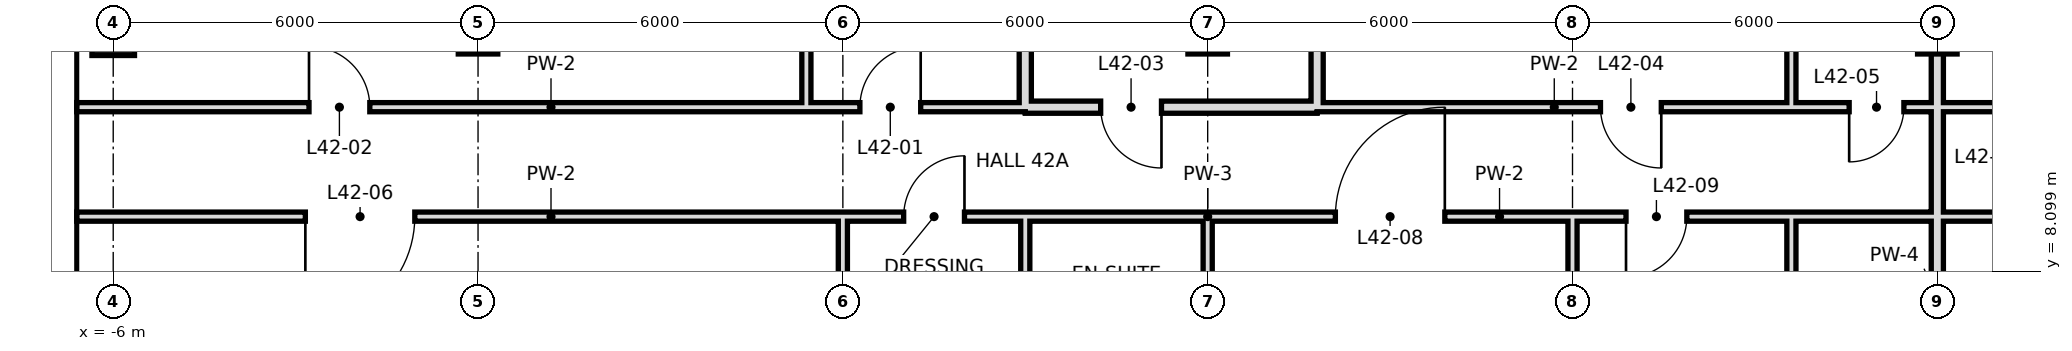
"""IFC4 building model, lengths in metres.
Left out: names, types, materials, properties, quantities, classifications, styles, units other than length and angle.
Written with IfcOpenShell. Run it as: python <this file> out.ifc"""

import sys

from ifc_helpers import new_model, si_unit, direction, frame, frame_2d, origin, origin_2d, place, context, subcontext, project, spatial, rectangle, hollow_rectangle, extrude, element, fill, save


model = new_model("IFC4")
c1 = context("Model", 3, precision=1e-05, world=origin(), true_north=direction((0.0, 1.0)))
c2 = subcontext(c1, "Body", "Model", "MODEL_VIEW")
j1 = project(units=[si_unit("LENGTHUNIT", "METRE"), si_unit("PLANEANGLEUNIT", "RADIAN")], contexts=[c1])
p1 = place(None, origin())
s1 = spatial("IfcSite", under=j1, at=p1, CompositionType="ELEMENT")
p2 = place(p1, origin())
s2 = spatial("IfcBuilding", under=s1, at=p2, CompositionType="ELEMENT")
p3 = place(p2, frame((0.0, 0.0, 181.6)))
s3 = spatial("IfcBuildingStorey", under=s2, at=p3, CompositionType="ELEMENT", Elevation=181.6)
p4 = place(p3, frame((-6.0, 12.0, 0.0), z_axis=(0.0, 0.0, 1.0), x_axis=(1.0, 0.0, 0.0)))
e1 = element("IfcColumn", 1, at=p4, inside=s3, PredefinedType="COLUMN", context=c2, shape_type="SweptSolid", body=[
    extrude(hollow_rectangle(XDim=0.7, YDim=0.7, WallThickness=0.036, at=origin_2d()), origin(), (0.0, 0.0, 1.0), 4.4),
])
for number, where, z_axis, x_axis in (
    (2, (0.0, 12.0, 0.0), (0.0, 0.0, 1.0), (1.0, 0.0, 0.0)),
    (3, (12.0, 12.0, 0.0), (0.0, 0.0, 1.0), (1.0, 0.0, 0.0)),
    (4, (24.0, 12.0, 0.0), (0.0, 0.0, 1.0), (1.0, 0.0, 0.0)),
):
    element("IfcColumn", number, at=place(p3, frame(where, z_axis=z_axis, x_axis=x_axis)), inside=s3, PredefinedType="COLUMN", context=c2, shape_type="SweptSolid", body=[
        extrude(hollow_rectangle(XDim=0.65, YDim=0.65, WallThickness=0.032, at=origin_2d()), origin(), (0.0, 0.0, 1.0), 4.4),
    ])
p5 = place(p3, frame((12.0, 6.0, 0.0), z_axis=(0.0, 0.0, 1.0), x_axis=(0.0, 1.0, 0.0)))
e5 = element("IfcWall", 5, at=p5, inside=s3, PredefinedType="PARTITIONING", context=c2, shape_type="SweptSolid", body=[
    extrude(rectangle(XDim=3.0, YDim=0.15, at=frame_2d((1.5, 0.0))), origin(), (0.0, 0.0, 1.0), 3.4),
])
p6 = place(p3, frame((13.8, 10.8, 0.0), z_axis=(0.0, 0.0, 1.0), x_axis=(0.0, 1.0, 0.0)))
e6 = element("IfcWall", 6, at=p6, inside=s3, PredefinedType="SOLIDWALL", context=c2, shape_type="SweptSolid", body=[
    extrude(rectangle(XDim=4.5, YDim=0.2, at=frame_2d((2.25, 0.0))), origin(), (0.0, 0.0, 1.0), 3.4),
])
p7 = place(p3, frame((18.0, -0.6, 0.0), z_axis=(0.0, 0.0, 1.0), x_axis=(0.0, 1.0, 0.0)))
e7 = element("IfcWall", 7, at=p7, inside=s3, PredefinedType="PARTITIONING", context=c2, shape_type="SweptSolid", body=[
    extrude(rectangle(XDim=9.6, YDim=0.15, at=frame_2d((4.8, 0.0))), origin(), (0.0, 0.0, 1.0), 3.4),
])
p8 = place(p3, frame((21.6, 6.0, 0.0), z_axis=(0.0, 0.0, 1.0), x_axis=(0.0, 1.0, 0.0)))
e8 = element("IfcWall", 8, at=p8, inside=s3, PredefinedType="PARTITIONING", context=c2, shape_type="SweptSolid", body=[
    extrude(rectangle(XDim=3.0, YDim=0.15, at=frame_2d((1.5, 0.0))), origin(), (0.0, 0.0, 1.0), 4.1),
])
p9 = place(p3, frame((21.6, 10.8, 0.0), z_axis=(0.0, 0.0, 1.0), x_axis=(0.0, 1.0, 0.0)))
e9 = element("IfcWall", 9, at=p9, inside=s3, PredefinedType="PARTITIONING", context=c2, shape_type="SweptSolid", body=[
    extrude(rectangle(XDim=4.5, YDim=0.15, at=frame_2d((2.25, 0.0))), origin(), (0.0, 0.0, 1.0), 4.1),
])
p10 = place(p3, frame((24.0, 0.0, 0.0), z_axis=(0.0, 0.0, 1.0), x_axis=(0.0, 1.0, 0.0)))
e10 = element("IfcWall", 10, at=p10, inside=s3, PredefinedType="SOLIDWALL", context=c2, shape_type="SweptSolid", body=[
    extrude(rectangle(XDim=15.3, YDim=0.2, at=frame_2d((7.65, 0.0))), origin(), (0.0, 0.0, 1.0), 3.4),
])
p11 = place(p3, frame((5.4, 10.8, 0.0), z_axis=(0.0, 0.0, 1.0), x_axis=(0.0, 1.0, 0.0)))
e11 = element("IfcWall", 11, at=p11, inside=s3, PredefinedType="PARTITIONING", context=c2, shape_type="SweptSolid", body=[
    extrude(rectangle(XDim=4.5, YDim=0.15, at=frame_2d((2.25, 0.0))), origin(), (0.0, 0.0, 1.0), 4.1),
])
p12 = place(p3, frame((6.0, -0.6, 0.0), z_axis=(0.0, 0.0, 1.0), x_axis=(0.0, 1.0, 0.0)))
e12 = element("IfcWall", 12, at=p12, inside=s3, PredefinedType="PARTITIONING", context=c2, shape_type="SweptSolid", body=[
    extrude(rectangle(XDim=9.6, YDim=0.15, at=frame_2d((4.8, 0.0))), origin(), (0.0, 0.0, 1.0), 3.4),
])
p13 = place(p3, frame((9.0, 10.8, 0.0), z_axis=(0.0, 0.0, 1.0), x_axis=(0.0, 1.0, 0.0)))
e13 = element("IfcWall", 13, at=p13, inside=s3, PredefinedType="SOLIDWALL", context=c2, shape_type="SweptSolid", body=[
    extrude(rectangle(XDim=4.5, YDim=0.2, at=frame_2d((2.25, 0.0))), origin(), (0.0, 0.0, 1.0), 3.4),
])
p14 = place(p3, frame((9.0, 6.0, 0.0), z_axis=(0.0, 0.0, 1.0), x_axis=(0.0, 1.0, 0.0)))
e14 = element("IfcWall", 14, at=p14, inside=s3, PredefinedType="PARTITIONING", context=c2, shape_type="SweptSolid", body=[
    extrude(rectangle(XDim=3.0, YDim=0.15, at=frame_2d((1.5, 0.0))), origin(), (0.0, 0.0, 1.0), 4.1),
])
p15 = place(p3, frame((9.0, 10.8, 0.0), z_axis=(0.0, 0.0, 1.0), x_axis=(1.0, 0.0, 0.0)))
e15 = element("IfcWall", 15, at=p15, inside=s3, PredefinedType="SOLIDWALL", context=c2, shape_type="SweptSolid", body=[
    extrude(rectangle(XDim=4.8, YDim=0.2, at=frame_2d((2.4, 0.0))), origin(), (0.0, 0.0, 1.0), 3.4),
])
p16 = place(p15, frame((1.24, 0.0, 0.0)))
e16 = element("IfcOpeningElement", 16, at=p16, cuts=e15, PredefinedType="OPENING", context=c2, shape_type="SweptSolid", body=[
    extrude(rectangle(XDim=1.0, YDim=2.4, at=frame_2d((0.5, 1.2))), frame((0.0, 0.11, 0.0), z_axis=(0.0, -1.0, 0.0), x_axis=(1.0, 0.0, 0.0)), (0.0, 0.0, 1.0), 0.22),
])
p17 = place(p3, frame((-6.6, 10.8, 0.0), z_axis=(0.0, 0.0, 1.0), x_axis=(1.0, 0.0, 0.0)))
e17 = element("IfcWall", 17, at=p17, inside=s3, PredefinedType="PARTITIONING", context=c2, shape_type="SweptSolid", body=[
    extrude(rectangle(XDim=15.6, YDim=0.15, at=frame_2d((7.8, 0.0))), origin(), (0.0, 0.0, 1.0), 4.1),
])
p18 = place(p17, frame((12.88, 0.0, 0.0)))
e18 = element("IfcOpeningElement", 18, at=p18, cuts=e17, PredefinedType="OPENING", context=c2, shape_type="SweptSolid", body=[
    extrude(rectangle(XDim=1.0, YDim=2.4, at=frame_2d((0.5, 1.2))), frame((0.0, 0.085, 0.0), z_axis=(0.0, -1.0, 0.0), x_axis=(1.0, 0.0, 0.0)), (0.0, 0.0, 1.0), 0.17),
])
p19 = place(p17, frame((3.82, 0.0, 0.0)))
e19 = element("IfcOpeningElement", 19, at=p19, cuts=e17, PredefinedType="OPENING", context=c2, shape_type="SweptSolid", body=[
    extrude(rectangle(XDim=1.0, YDim=2.4, at=frame_2d((0.5, 1.2))), frame((0.0, 0.085, 0.0), z_axis=(0.0, -1.0, 0.0), x_axis=(1.0, 0.0, 0.0)), (0.0, 0.0, 1.0), 0.17),
])
p20 = place(p3, frame((13.8, 10.8, 0.0), z_axis=(0.0, 0.0, 1.0), x_axis=(1.0, 0.0, 0.0)))
e20 = element("IfcWall", 20, at=p20, inside=s3, PredefinedType="PARTITIONING", context=c2, shape_type="SweptSolid", body=[
    extrude(rectangle(XDim=7.8, YDim=0.15, at=frame_2d((3.9, 0.0))), origin(), (0.0, 0.0, 1.0), 4.1),
])
p21 = place(p20, frame((4.66, 0.0, 0.0)))
e21 = element("IfcOpeningElement", 21, at=p21, cuts=e20, PredefinedType="OPENING", context=c2, shape_type="SweptSolid", body=[
    extrude(rectangle(XDim=1.0, YDim=2.4, at=frame_2d((0.5, 1.2))), frame((0.0, 0.085, 0.0), z_axis=(0.0, -1.0, 0.0), x_axis=(1.0, 0.0, 0.0)), (0.0, 0.0, 1.0), 0.17),
])
p22 = place(p3, frame((24.0, 10.8, 0.0), z_axis=(0.0, 0.0, 1.0), x_axis=(1.0, 0.0, 0.0)))
e22 = element("IfcWall", 22, at=p22, inside=s3, PredefinedType="PARTITIONING", context=c2, shape_type="SweptSolid", body=[
    extrude(rectangle(XDim=3.6, YDim=0.15, at=frame_2d((1.8, 0.0))), origin(), (0.0, 0.0, 1.0), 4.1),
])
p23 = place(p22, frame((1.72, 0.0, 0.0)))
e23 = element("IfcOpeningElement", 23, at=p23, cuts=e22, PredefinedType="OPENING", context=c2, shape_type="SweptSolid", body=[
    extrude(rectangle(XDim=1.0, YDim=2.4, at=frame_2d((0.5, 1.2))), frame((0.0, 0.085, 0.0), z_axis=(0.0, -1.0, 0.0), x_axis=(1.0, 0.0, 0.0)), (0.0, 0.0, 1.0), 0.17),
])
p24 = place(p3, frame((21.6, 10.8, 0.0), z_axis=(0.0, 0.0, 1.0), x_axis=(1.0, 0.0, 0.0)))
e24 = element("IfcWall", 24, at=p24, inside=s3, PredefinedType="PARTITIONING", context=c2, shape_type="SweptSolid", body=[
    extrude(rectangle(XDim=2.4, YDim=0.15, at=frame_2d((1.2, 0.0))), origin(), (0.0, 0.0, 1.0), 4.1),
])
p25 = place(p24, frame((0.95, 0.0, 0.0)))
e25 = element("IfcOpeningElement", 25, at=p25, cuts=e24, PredefinedType="OPENING", context=c2, shape_type="SweptSolid", body=[
    extrude(rectangle(XDim=0.9, YDim=2.4, at=frame_2d((0.45, 1.2))), frame((0.0, 0.085, 0.0), z_axis=(0.0, -1.0, 0.0), x_axis=(1.0, 0.0, 0.0)), (0.0, 0.0, 1.0), 0.17),
])
p26 = place(p3, frame((-6.6, 9.0, 0.0), z_axis=(0.0, 0.0, 1.0), x_axis=(1.0, 0.0, 0.0)))
e26 = element("IfcWall", 26, at=p26, inside=s3, PredefinedType="PARTITIONING", context=c2, shape_type="SweptSolid", body=[
    extrude(rectangle(XDim=15.6, YDim=0.15, at=frame_2d((7.8, 0.0))), origin(), (0.0, 0.0, 1.0), 4.1),
])
p27 = place(p26, frame((3.76, 0.0, 0.0)))
e27 = element("IfcOpeningElement", 27, at=p27, cuts=e26, PredefinedType="OPENING", context=c2, shape_type="SweptSolid", body=[
    extrude(rectangle(XDim=1.8, YDim=2.4, at=frame_2d((0.9, 1.2))), frame((0.0, 0.085, 0.0), z_axis=(0.0, -1.0, 0.0), x_axis=(1.0, 0.0, 0.0)), (0.0, 0.0, 1.0), 0.17),
])
p28 = place(p26, frame((13.6, 0.0, 0.0)))
e28 = element("IfcOpeningElement", 28, at=p28, cuts=e26, PredefinedType="OPENING", context=c2, shape_type="SweptSolid", body=[
    extrude(rectangle(XDim=1.0, YDim=2.4, at=frame_2d((0.5, 1.2))), frame((0.0, 0.085, 0.0), z_axis=(0.0, -1.0, 0.0), x_axis=(1.0, 0.0, 0.0)), (0.0, 0.0, 1.0), 0.17),
])
p29 = place(p3, frame((12.0, 9.0, 0.0), z_axis=(0.0, 0.0, 1.0), x_axis=(1.0, 0.0, 0.0)))
e29 = element("IfcWall", 29, at=p29, inside=s3, PredefinedType="PARTITIONING", context=c2, shape_type="SweptSolid", body=[
    extrude(rectangle(XDim=9.6, YDim=0.15, at=frame_2d((4.8, 0.0))), origin(), (0.0, 0.0, 1.0), 4.1),
])
p30 = place(p29, frame((2.1, 0.0, 0.0)))
e30 = element("IfcOpeningElement", 30, at=p30, cuts=e29, PredefinedType="OPENING", context=c2, shape_type="SweptSolid", body=[
    extrude(rectangle(XDim=1.8, YDim=2.4, at=frame_2d((0.9, 1.2))), frame((0.0, 0.085, 0.0), z_axis=(0.0, -1.0, 0.0), x_axis=(1.0, 0.0, 0.0)), (0.0, 0.0, 1.0), 0.17),
])
p31 = place(p29, frame((6.88, 0.0, 0.0)))
e31 = element("IfcOpeningElement", 31, at=p31, cuts=e29, PredefinedType="OPENING", context=c2, shape_type="SweptSolid", body=[
    extrude(rectangle(XDim=1.0, YDim=2.4, at=frame_2d((0.5, 1.2))), frame((0.0, 0.085, 0.0), z_axis=(0.0, -1.0, 0.0), x_axis=(1.0, 0.0, 0.0)), (0.0, 0.0, 1.0), 0.17),
])
p32 = place(p3, frame((24.0, 9.0, 0.0), z_axis=(0.0, 0.0, 1.0), x_axis=(1.0, 0.0, 0.0)))
e32 = element("IfcWall", 32, at=p32, inside=s3, PredefinedType="PARTITIONING", context=c2, shape_type="SweptSolid", body=[
    extrude(rectangle(XDim=3.6, YDim=0.15, at=frame_2d((1.8, 0.0))), origin(), (0.0, 0.0, 1.0), 4.1),
])
p33 = place(p32, frame((1.3, 0.0, 0.0)))
e33 = element("IfcOpeningElement", 33, at=p33, cuts=e32, PredefinedType="OPENING", context=c2, shape_type="SweptSolid", body=[
    extrude(rectangle(XDim=1.0, YDim=2.4, at=frame_2d((0.5, 1.2))), frame((0.0, 0.085, 0.0), z_axis=(0.0, -1.0, 0.0), x_axis=(1.0, 0.0, 0.0)), (0.0, 0.0, 1.0), 0.17),
])
p34 = place(p3, frame((9.0, 9.0, 0.0), z_axis=(0.0, 0.0, 1.0), x_axis=(1.0, 0.0, 0.0)))
e34 = element("IfcWall", 34, at=p34, inside=s3, PredefinedType="PARTITIONING", context=c2, shape_type="SweptSolid", body=[
    extrude(rectangle(XDim=3.0, YDim=0.15, at=frame_2d((1.5, 0.0))), origin(), (0.0, 0.0, 1.0), 4.1),
])
p35 = place(p3, frame((21.6, 9.0, 0.0), z_axis=(0.0, 0.0, 1.0), x_axis=(1.0, 0.0, 0.0)))
e35 = element("IfcWall", 35, at=p35, inside=s3, PredefinedType="PARTITIONING", context=c2, shape_type="SweptSolid", body=[
    extrude(rectangle(XDim=2.4, YDim=0.15, at=frame_2d((1.2, 0.0))), origin(), (0.0, 0.0, 1.0), 4.1),
])
p36 = place(p18, frame((1.0, 0.0, 0.0), z_axis=(0.0, 0.0, 1.0), x_axis=(-1.0, 0.0, 0.0)))
e36 = element("IfcDoor", 36, at=p36, inside=s3, OperationType="SINGLE_SWING_LEFT", PredefinedType="DOOR", context=c2, shape_type="SweptSolid", body=[
    extrude(rectangle(XDim=1.0, YDim=2.4, at=frame_2d((0.5, 1.2))), frame((0.0, 0.025, 0.0), z_axis=(0.0, -1.0, 0.0), x_axis=(1.0, 0.0, 0.0)), (0.0, 0.0, 1.0), 0.05),
])
fill(e18, e36)
p37 = place(p19, origin())
e37 = element("IfcDoor", 37, at=p37, inside=s3, OperationType="SINGLE_SWING_LEFT", PredefinedType="DOOR", context=c2, shape_type="SweptSolid", body=[
    extrude(rectangle(XDim=1.0, YDim=2.4, at=frame_2d((0.5, 1.2))), frame((0.0, 0.025, 0.0), z_axis=(0.0, -1.0, 0.0), x_axis=(1.0, 0.0, 0.0)), (0.0, 0.0, 1.0), 0.05),
])
fill(e19, e37)
p38 = place(p16, origin())
e38 = element("IfcDoor", 38, at=p38, inside=s3, OperationType="SINGLE_SWING_RIGHT", PredefinedType="DOOR", context=c2, shape_type="SweptSolid", body=[
    extrude(rectangle(XDim=1.0, YDim=2.4, at=frame_2d((0.5, 1.2))), frame((0.0, 0.025, 0.0), z_axis=(0.0, -1.0, 0.0), x_axis=(1.0, 0.0, 0.0)), (0.0, 0.0, 1.0), 0.05),
])
fill(e16, e38)
p39 = place(p21, origin())
e39 = element("IfcDoor", 39, at=p39, inside=s3, OperationType="SINGLE_SWING_RIGHT", PredefinedType="DOOR", context=c2, shape_type="SweptSolid", body=[
    extrude(rectangle(XDim=1.0, YDim=2.4, at=frame_2d((0.5, 1.2))), frame((0.0, 0.025, 0.0), z_axis=(0.0, -1.0, 0.0), x_axis=(1.0, 0.0, 0.0)), (0.0, 0.0, 1.0), 0.05),
])
fill(e21, e39)
p40 = place(p25, frame((0.9, 0.0, 0.0), z_axis=(0.0, 0.0, 1.0), x_axis=(-1.0, 0.0, 0.0)))
e40 = element("IfcDoor", 40, at=p40, inside=s3, OperationType="SINGLE_SWING_RIGHT", PredefinedType="DOOR", context=c2, shape_type="SweptSolid", body=[
    extrude(rectangle(XDim=0.9, YDim=2.4, at=frame_2d((0.45, 1.2))), frame((0.0, 0.025, 0.0), z_axis=(0.0, -1.0, 0.0), x_axis=(1.0, 0.0, 0.0)), (0.0, 0.0, 1.0), 0.05),
])
fill(e25, e40)
p41 = place(p27, frame((1.8, 0.0, 0.0), z_axis=(0.0, 0.0, 1.0), x_axis=(-1.0, 0.0, 0.0)))
e41 = element("IfcDoor", 41, at=p41, inside=s3, OperationType="SINGLE_SWING_RIGHT", PredefinedType="DOOR", context=c2, shape_type="SweptSolid", body=[
    extrude(rectangle(XDim=1.8, YDim=2.4, at=frame_2d((0.9, 1.2))), frame((0.0, 0.025, 0.0), z_axis=(0.0, -1.0, 0.0), x_axis=(1.0, 0.0, 0.0)), (0.0, 0.0, 1.0), 0.05),
])
fill(e27, e41)
p42 = place(p28, frame((1.0, 0.0, 0.0), z_axis=(0.0, 0.0, 1.0), x_axis=(-1.0, 0.0, 0.0)))
e42 = element("IfcDoor", 42, at=p42, inside=s3, OperationType="SINGLE_SWING_LEFT", PredefinedType="DOOR", context=c2, shape_type="SweptSolid", body=[
    extrude(rectangle(XDim=1.0, YDim=2.4, at=frame_2d((0.5, 1.2))), frame((0.0, 0.025, 0.0), z_axis=(0.0, -1.0, 0.0), x_axis=(1.0, 0.0, 0.0)), (0.0, 0.0, 1.0), 0.05),
])
fill(e28, e42)
p43 = place(p30, frame((1.8, 0.0, 0.0), z_axis=(0.0, 0.0, 1.0), x_axis=(-1.0, 0.0, 0.0)))
e43 = element("IfcDoor", 43, at=p43, inside=s3, OperationType="SINGLE_SWING_LEFT", PredefinedType="DOOR", context=c2, shape_type="SweptSolid", body=[
    extrude(rectangle(XDim=1.8, YDim=2.4, at=frame_2d((0.9, 1.2))), frame((0.0, 0.025, 0.0), z_axis=(0.0, -1.0, 0.0), x_axis=(1.0, 0.0, 0.0)), (0.0, 0.0, 1.0), 0.05),
])
fill(e30, e43)
p44 = place(p31, frame((1.0, 0.0, 0.0), z_axis=(0.0, 0.0, 1.0), x_axis=(-1.0, 0.0, 0.0)))
e44 = element("IfcDoor", 44, at=p44, inside=s3, OperationType="SINGLE_SWING_RIGHT", PredefinedType="DOOR", context=c2, shape_type="SweptSolid", body=[
    extrude(rectangle(XDim=1.0, YDim=2.4, at=frame_2d((0.5, 1.2))), frame((0.0, 0.025, 0.0), z_axis=(0.0, -1.0, 0.0), x_axis=(1.0, 0.0, 0.0)), (0.0, 0.0, 1.0), 0.05),
])
fill(e31, e44)
save(model, sys.argv[1])
